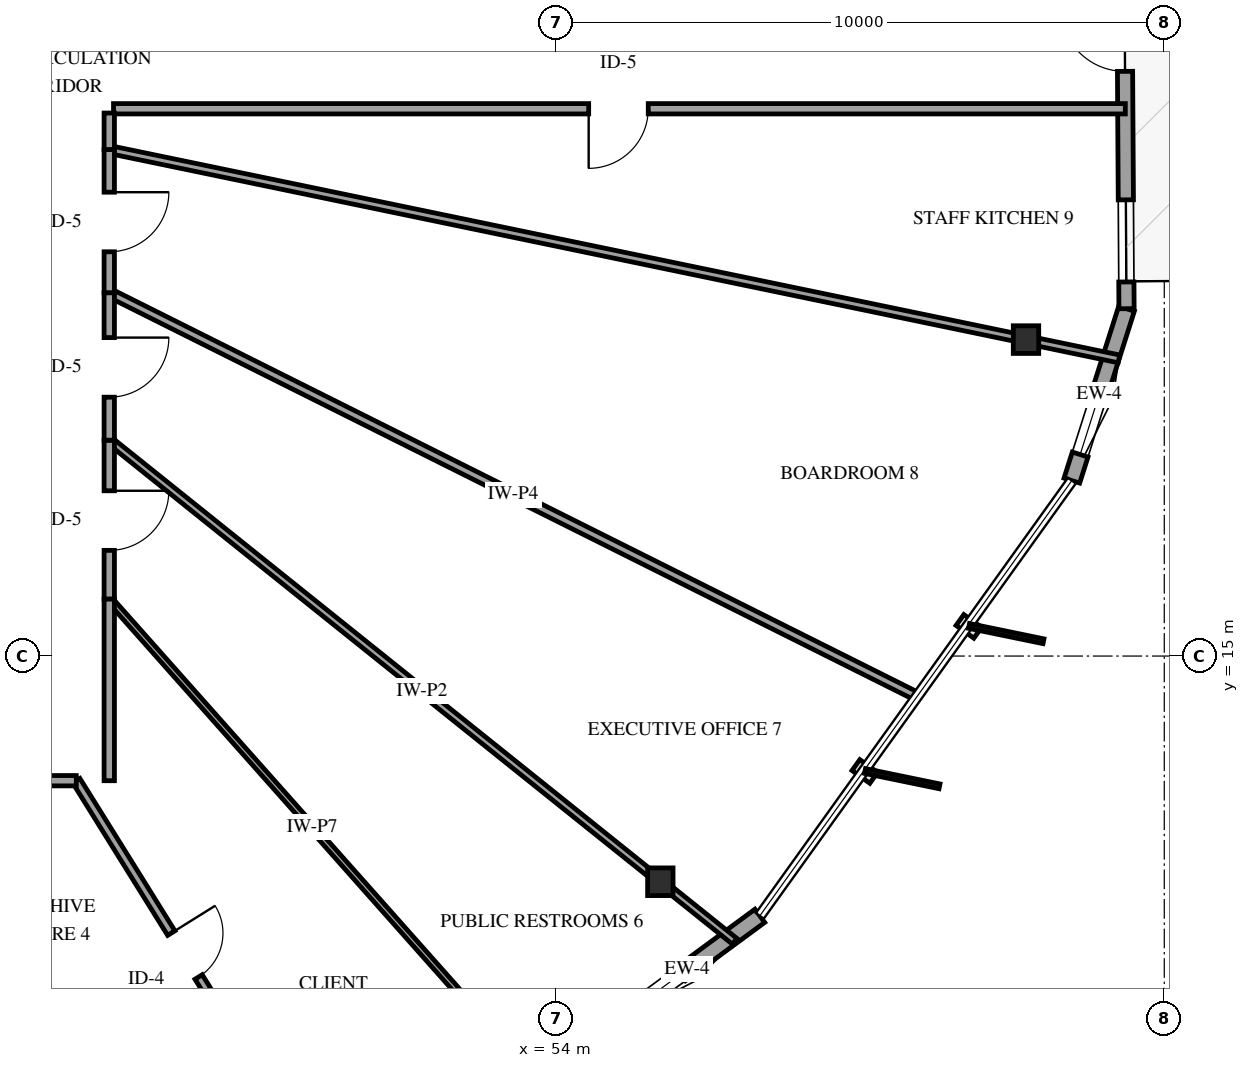
"""IFC4 building model, lengths in metres.
Left out: names, types, materials, properties, quantities, classifications, styles, units other than length and angle.
Written with IfcOpenShell. Run it as: python <this file> out.ifc"""

import sys

from ifc_helpers import new_model, si_unit, direction, frame, frame_2d, origin, origin_2d, place, context, subcontext, project, spatial, rectangle, i_section, extrude, element, fill, save


model = new_model("IFC4")
c1 = context("Model", 3, precision=1e-05, world=origin(), true_north=direction((0.0, 1.0)))
c2 = subcontext(c1, "Body", "Model", "MODEL_VIEW")
j1 = project(units=[si_unit("LENGTHUNIT", "METRE"), si_unit("PLANEANGLEUNIT", "RADIAN")], contexts=[c1])
p1 = place(None, origin())
s1 = spatial("IfcSite", under=j1, at=p1, CompositionType="ELEMENT")
p2 = place(p1, origin())
s2 = spatial("IfcBuilding", under=s1, at=p2, CompositionType="ELEMENT")
p3 = place(p2, frame((0.0, 0.0, 99.1)))
s3 = spatial("IfcBuildingStorey", under=s2, at=p3, CompositionType="ELEMENT", Elevation=99.1)
for number, where, z_axis, x_axis in (
    (1, (55.712, 11.289, 0.0), (0.0, 0.0, 1.0), (1.0, 0.0, 0.0)),
    (2, (61.726, 20.204, 0.0), (0.0, 0.0, 1.0), (1.0, 0.0, 0.0)),
):
    element("IfcColumn", number, at=place(p3, frame(where, z_axis=z_axis, x_axis=x_axis)), inside=s3, PredefinedType="COLUMN", context=c2, shape_type="SweptSolid", body=[
        extrude(i_section(OverallWidth=0.418, OverallDepth=0.455, WebThickness=0.042, FlangeThickness=0.068, FilletRadius=0.038, at=origin_2d()), origin(), (0.0, 0.0, 1.0), 3.9),
    ])
p4 = place(p3, frame((54.96, 8.969, 0.0), z_axis=(0.0, 0.0, 1.0), x_axis=(0.80529158798, 0.592878957569, 0.0)))
e3 = element("IfcWall", 3, at=p4, inside=s3, PredefinedType="SOLIDWALL", context=c2, shape_type="SweptSolid", body=[
    extrude(rectangle(XDim=2.967, YDim=0.27, at=frame_2d((1.483, 0.0))), origin(), (0.0, 0.0, 1.0), 2.979),
])
p5 = place(p4, frame((0.45, 0.0, 0.75)))
e4 = element("IfcOpeningElement", 4, at=p5, cuts=e3, PredefinedType="OPENING", context=c2, shape_type="SweptSolid", body=[
    extrude(rectangle(XDim=0.9, YDim=1.5, at=frame_2d((0.45, 0.75))), frame((0.0, 0.145, 0.0), z_axis=(0.0, -1.0, 0.0), x_axis=(1.0, 0.0, 0.0)), (0.0, 0.0, 1.0), 0.29),
])
p6 = place(p3, frame((62.48, 17.885, 0.0), z_axis=(0.0, 0.0, 1.0), x_axis=(0.303013428865, 0.952986286327, 0.0)))
e5 = element("IfcWall", 5, at=p6, inside=s3, PredefinedType="SOLIDWALL", context=c2, shape_type="SweptSolid", body=[
    extrude(rectangle(XDim=2.967, YDim=0.27, at=frame_2d((1.483, 0.0))), origin(), (0.0, 0.0, 1.0), 2.979),
])
p7 = place(p6, frame((0.45, 0.0, 0.75)))
e6 = element("IfcOpeningElement", 6, at=p7, cuts=e5, PredefinedType="OPENING", context=c2, shape_type="SweptSolid", body=[
    extrude(rectangle(XDim=0.9, YDim=1.5, at=frame_2d((0.45, 0.75))), frame((0.0, 0.145, 0.0), z_axis=(0.0, -1.0, 0.0), x_axis=(1.0, 0.0, 0.0)), (0.0, 0.0, 1.0), 0.29),
])
p8 = place(p3, frame((63.379, 20.712, 0.0), z_axis=(0.0, 0.0, 1.0), x_axis=(-0.006293019465, 0.999980198757, 0.0)))
e7 = element("IfcWall", 7, at=p8, inside=s3, PredefinedType="SOLIDWALL", context=c2, shape_type="SweptSolid", body=[
    extrude(rectangle(XDim=8.807, YDim=0.25, at=frame_2d((4.403, 0.0))), origin(), (0.0, 0.0, 1.0), 2.979),
])
p9 = place(p8, frame((3.903, 0.0, 0.0)))
e8 = element("IfcOpeningElement", 8, at=p9, cuts=e7, PredefinedType="OPENING", context=c2, shape_type="SweptSolid", body=[
    extrude(rectangle(XDim=1.05, YDim=2.15, at=frame_2d((0.525, 1.075))), frame((0.0, 0.135, 0.0), z_axis=(0.0, -1.0, 0.0), x_axis=(1.0, 0.0, 0.0)), (0.0, 0.0, 1.0), 0.27),
])
p10 = place(p8, frame((0.44, 0.0, 0.72)))
e9 = element("IfcOpeningElement", 9, at=p10, cuts=e7, PredefinedType="OPENING", context=c2, shape_type="SweptSolid", body=[
    extrude(rectangle(XDim=1.35, YDim=1.65, at=frame_2d((0.675, 0.825))), frame((0.0, 0.135, 0.0), z_axis=(0.0, -1.0, 0.0), x_axis=(1.0, 0.0, 0.0)), (0.0, 0.0, 1.0), 0.27),
])
p11 = place(p8, frame((5.593, 0.0, 0.72)))
e10 = element("IfcOpeningElement", 10, at=p11, cuts=e7, PredefinedType="OPENING", context=c2, shape_type="SweptSolid", body=[
    extrude(rectangle(XDim=1.35, YDim=1.65, at=frame_2d((0.675, 0.825))), frame((0.0, 0.135, 0.0), z_axis=(0.0, -1.0, 0.0), x_axis=(1.0, 0.0, 0.0)), (0.0, 0.0, 1.0), 0.27),
])
p12 = place(p3, frame((46.65, 23.33, 0.0), z_axis=(0.0, 0.0, 1.0), x_axis=(0.979169010493, -0.203046913027, 0.0)))
e11 = element("IfcWall", 11, at=p12, inside=s3, PredefinedType="PARTITIONING", context=c2, shape_type="SweptSolid", body=[
    extrude(rectangle(XDim=16.957, YDim=0.13, at=frame_2d((8.479, 0.0))), origin(), (0.0, 0.0, 1.0), 2.895),
])
p13 = place(p3, frame((63.359, 24.0, 0.0), z_axis=(0.0, 0.0, 1.0), x_axis=(-1.0, 0.0, 0.0)))
e12 = element("IfcWall", 12, at=p13, inside=s3, PredefinedType="PARTITIONING", context=c2, shape_type="SweptSolid", body=[
    extrude(rectangle(XDim=16.639, YDim=0.17, at=frame_2d((8.319, 0.0))), origin(), (0.0, 0.0, 1.0), 3.6),
])
p14 = place(p13, frame((7.845, 0.0, 0.0)))
e13 = element("IfcOpeningElement", 13, at=p14, cuts=e12, PredefinedType="OPENING", context=c2, shape_type="SweptSolid", body=[
    extrude(rectangle(XDim=0.98, YDim=2.15, at=frame_2d((0.49, 1.075))), frame((0.0, 0.095, 0.0), z_axis=(0.0, -1.0, 0.0), x_axis=(1.0, 0.0, 0.0)), (0.0, 0.0, 1.0), 0.19),
])
p15 = place(p3, frame((46.65, 20.975, 0.0), z_axis=(0.0, 0.0, 1.0), x_axis=(0.894492933533, -0.447082086266, 0.0)))
e14 = element("IfcWall", 14, at=p15, inside=s3, PredefinedType="PARTITIONING", context=c2, shape_type="SweptSolid", body=[
    extrude(rectangle(XDim=14.852, YDim=0.14, at=frame_2d((7.426, 0.0))), origin(), (0.0, 0.0, 1.0), 3.6),
])
p16 = place(p3, frame((46.65, 18.55, 0.0), z_axis=(0.0, 0.0, 1.0), x_axis=(0.780393276033, -0.625289000961, 0.0)))
e15 = element("IfcWall", 15, at=p16, inside=s3, PredefinedType="PARTITIONING", context=c2, shape_type="SweptSolid", body=[
    extrude(rectangle(XDim=13.179, YDim=0.12, at=frame_2d((6.59, 0.0))), origin(), (0.0, 0.0, 1.0), 2.978),
])
p17 = place(p3, frame((46.65, 15.936, 0.0), z_axis=(0.0, 0.0, 1.0), x_axis=(0.664172243605, -0.7475795816, 0.0)))
e16 = element("IfcWall", 16, at=p17, inside=s3, PredefinedType="PARTITIONING", context=c2, shape_type="SweptSolid", body=[
    extrude(rectangle(XDim=10.046, YDim=0.1, at=frame_2d((5.023, 0.0))), origin(), (0.0, 0.0, 1.0), 2.978),
])
p18 = place(p3, frame((43.455, 12.95, 0.0), z_axis=(0.0, 0.0, 1.0), x_axis=(0.373850874789, -0.927488826574, 0.0)))
e17 = element("IfcWall", 17, at=p18, inside=s3, PredefinedType="PARTITIONING", context=c2, shape_type="SweptSolid", body=[
    extrude(rectangle(XDim=7.353, YDim=0.12, at=frame_2d((3.677, 0.0))), origin(), (0.0, 0.0, 1.0), 2.895),
])
p19 = place(p3, frame((46.108, 12.95, 0.0), z_axis=(0.0, 0.0, 1.0), x_axis=(0.528926462894, -0.848667659835, 0.0)))
e18 = element("IfcWall", 18, at=p19, inside=s3, PredefinedType="PARTITIONING", context=c2, shape_type="SweptSolid", body=[
    extrude(rectangle(XDim=6.755, YDim=0.14, at=frame_2d((3.377, 0.0))), origin(), (0.0, 0.0, 1.0), 3.6),
])
p20 = place(p19, frame((2.953, 0.0, 0.0)))
e19 = element("IfcOpeningElement", 19, at=p20, cuts=e18, PredefinedType="OPENING", context=c2, shape_type="SweptSolid", body=[
    extrude(rectangle(XDim=0.85, YDim=2.1, at=frame_2d((0.425, 1.05))), frame((0.0, 0.08, 0.0), z_axis=(0.0, -1.0, 0.0), x_axis=(1.0, 0.0, 0.0)), (0.0, 0.0, 1.0), 0.16),
])
p21 = place(p3, frame((46.108, 12.95, 0.0), z_axis=(0.0, 0.0, 1.0), x_axis=(-1.0, 0.0, 0.0)))
e20 = element("IfcWall", 20, at=p21, inside=s3, PredefinedType="PARTITIONING", context=c2, shape_type="SweptSolid", body=[
    extrude(rectangle(XDim=2.653, YDim=0.17, at=frame_2d((1.326, 0.0))), origin(), (0.0, 0.0, 1.0), 3.6),
])
p22 = place(p21, frame((0.851, 0.0, 0.0)))
e21 = element("IfcOpeningElement", 21, at=p22, cuts=e20, PredefinedType="OPENING", context=c2, shape_type="SweptSolid", body=[
    extrude(rectangle(XDim=0.98, YDim=2.15, at=frame_2d((0.49, 1.075))), frame((0.0, 0.095, 0.0), z_axis=(0.0, -1.0, 0.0), x_axis=(1.0, 0.0, 0.0)), (0.0, 0.0, 1.0), 0.19),
])
p23 = place(p3, frame((46.65, 18.55, 0.0), z_axis=(0.0, 0.0, 1.0), x_axis=(0.0, -1.0, 0.0)))
e22 = element("IfcWall", 22, at=p23, inside=s3, PredefinedType="PARTITIONING", context=c2, shape_type="SweptSolid", body=[
    extrude(rectangle(XDim=2.614, YDim=0.17, at=frame_2d((1.307, 0.0))), origin(), (0.0, 0.0, 1.0), 3.6),
])
p24 = place(p23, frame((0.832, 0.0, 0.0)))
e23 = element("IfcOpeningElement", 23, at=p24, cuts=e22, PredefinedType="OPENING", context=c2, shape_type="SweptSolid", body=[
    extrude(rectangle(XDim=0.98, YDim=2.15, at=frame_2d((0.49, 1.075))), frame((0.0, 0.095, 0.0), z_axis=(0.0, -1.0, 0.0), x_axis=(1.0, 0.0, 0.0)), (0.0, 0.0, 1.0), 0.19),
])
p25 = place(p3, frame((46.65, 20.975, 0.0), z_axis=(0.0, 0.0, 1.0), x_axis=(0.0, -1.0, 0.0)))
e24 = element("IfcWall", 24, at=p25, inside=s3, PredefinedType="PARTITIONING", context=c2, shape_type="SweptSolid", body=[
    extrude(rectangle(XDim=2.425, YDim=0.17, at=frame_2d((1.212, 0.0))), origin(), (0.0, 0.0, 1.0), 3.6),
])
p26 = place(p25, frame((0.738, 0.0, 0.0)))
e25 = element("IfcOpeningElement", 25, at=p26, cuts=e24, PredefinedType="OPENING", context=c2, shape_type="SweptSolid", body=[
    extrude(rectangle(XDim=0.98, YDim=2.15, at=frame_2d((0.49, 1.075))), frame((0.0, 0.095, 0.0), z_axis=(0.0, -1.0, 0.0), x_axis=(1.0, 0.0, 0.0)), (0.0, 0.0, 1.0), 0.19),
])
p27 = place(p3, frame((46.65, 23.33, 0.0), z_axis=(0.0, 0.0, 1.0), x_axis=(0.0, -1.0, 0.0)))
e26 = element("IfcWall", 26, at=p27, inside=s3, PredefinedType="PARTITIONING", context=c2, shape_type="SweptSolid", body=[
    extrude(rectangle(XDim=2.355, YDim=0.17, at=frame_2d((1.177, 0.0))), origin(), (0.0, 0.0, 1.0), 3.6),
])
p28 = place(p27, frame((0.702, 0.0, 0.0)))
e27 = element("IfcOpeningElement", 27, at=p28, cuts=e26, PredefinedType="OPENING", context=c2, shape_type="SweptSolid", body=[
    extrude(rectangle(XDim=0.98, YDim=2.15, at=frame_2d((0.49, 1.075))), frame((0.0, 0.095, 0.0), z_axis=(0.0, -1.0, 0.0), x_axis=(1.0, 0.0, 0.0)), (0.0, 0.0, 1.0), 0.19),
])
p29 = place(p3, frame((46.65, 23.93, 0.0), z_axis=(0.0, 0.0, 1.0), x_axis=(0.0, -1.0, 0.0)))
e28 = element("IfcWall", 28, at=p29, inside=s3, PredefinedType="PARTITIONING", context=c2, shape_type="SweptSolid", body=[
    extrude(rectangle(XDim=0.6, YDim=0.17, at=frame_2d((0.3, 0.0))), origin(), (0.0, 0.0, 1.0), 3.6),
])
p30 = place(p3, frame((46.65, 15.936, 0.0), z_axis=(0.0, 0.0, 1.0), x_axis=(0.0, -1.0, 0.0)))
e29 = element("IfcWall", 29, at=p30, inside=s3, PredefinedType="PARTITIONING", context=c2, shape_type="SweptSolid", body=[
    extrude(rectangle(XDim=2.986, YDim=0.17, at=frame_2d((1.493, 0.0))), origin(), (0.0, 0.0, 1.0), 3.6),
])
p31 = place(p5, origin())
e30 = element("IfcWindow", 30, at=p31, inside=s3, PartitioningType="SINGLE_PANEL", PredefinedType="WINDOW", context=c2, shape_type="SweptSolid", body=[
    extrude(rectangle(XDim=0.9, YDim=1.5, at=frame_2d((0.45, 0.75))), frame((0.0, 0.03, 0.0), z_axis=(0.0, -1.0, 0.0), x_axis=(1.0, 0.0, 0.0)), (0.0, 0.0, 1.0), 0.06),
])
fill(e4, e30)
p32 = place(p7, origin())
e31 = element("IfcWindow", 31, at=p32, inside=s3, PartitioningType="SINGLE_PANEL", PredefinedType="WINDOW", context=c2, shape_type="SweptSolid", body=[
    extrude(rectangle(XDim=0.9, YDim=1.5, at=frame_2d((0.45, 0.75))), frame((0.0, 0.03, 0.0), z_axis=(0.0, -1.0, 0.0), x_axis=(1.0, 0.0, 0.0)), (0.0, 0.0, 1.0), 0.06),
])
fill(e6, e31)
p33 = place(p9, origin())
e32 = element("IfcDoor", 32, at=p33, inside=s3, OperationType="SINGLE_SWING_RIGHT", PredefinedType="DOOR", context=c2, shape_type="SweptSolid", body=[
    extrude(rectangle(XDim=1.05, YDim=2.15, at=frame_2d((0.525, 1.075))), frame((0.0, 0.025, 0.0), z_axis=(0.0, -1.0, 0.0), x_axis=(1.0, 0.0, 0.0)), (0.0, 0.0, 1.0), 0.05),
])
fill(e8, e32)
p34 = place(p10, origin())
e33 = element("IfcWindow", 33, at=p34, inside=s3, PartitioningType="SINGLE_PANEL", PredefinedType="WINDOW", context=c2, shape_type="SweptSolid", body=[
    extrude(rectangle(XDim=1.35, YDim=1.65, at=frame_2d((0.675, 0.825))), frame((0.0, 0.03, 0.0), z_axis=(0.0, -1.0, 0.0), x_axis=(1.0, 0.0, 0.0)), (0.0, 0.0, 1.0), 0.06),
])
fill(e9, e33)
p35 = place(p14, origin())
e34 = element("IfcDoor", 34, at=p35, inside=s3, OperationType="SINGLE_SWING_RIGHT", PredefinedType="DOOR", context=c2, shape_type="SweptSolid", body=[
    extrude(rectangle(XDim=0.98, YDim=2.15, at=frame_2d((0.49, 1.075))), frame((0.0, 0.025, 0.0), z_axis=(0.0, -1.0, 0.0), x_axis=(1.0, 0.0, 0.0)), (0.0, 0.0, 1.0), 0.05),
])
fill(e13, e34)
p36 = place(p20, origin())
e35 = element("IfcDoor", 35, at=p36, inside=s3, OperationType="SINGLE_SWING_LEFT", PredefinedType="DOOR", context=c2, shape_type="SweptSolid", body=[
    extrude(rectangle(XDim=0.85, YDim=2.1, at=frame_2d((0.425, 1.05))), frame((0.0, 0.025, 0.0), z_axis=(0.0, -1.0, 0.0), x_axis=(1.0, 0.0, 0.0)), (0.0, 0.0, 1.0), 0.05),
])
fill(e19, e35)
p37 = place(p24, origin())
e36 = element("IfcDoor", 36, at=p37, inside=s3, OperationType="SINGLE_SWING_LEFT", PredefinedType="DOOR", context=c2, shape_type="SweptSolid", body=[
    extrude(rectangle(XDim=0.98, YDim=2.15, at=frame_2d((0.49, 1.075))), frame((0.0, 0.025, 0.0), z_axis=(0.0, -1.0, 0.0), x_axis=(1.0, 0.0, 0.0)), (0.0, 0.0, 1.0), 0.05),
])
fill(e23, e36)
p38 = place(p26, origin())
e37 = element("IfcDoor", 37, at=p38, inside=s3, OperationType="SINGLE_SWING_LEFT", PredefinedType="DOOR", context=c2, shape_type="SweptSolid", body=[
    extrude(rectangle(XDim=0.98, YDim=2.15, at=frame_2d((0.49, 1.075))), frame((0.0, 0.025, 0.0), z_axis=(0.0, -1.0, 0.0), x_axis=(1.0, 0.0, 0.0)), (0.0, 0.0, 1.0), 0.05),
])
fill(e25, e37)
p39 = place(p28, origin())
e38 = element("IfcDoor", 38, at=p39, inside=s3, OperationType="SINGLE_SWING_LEFT", PredefinedType="DOOR", context=c2, shape_type="SweptSolid", body=[
    extrude(rectangle(XDim=0.98, YDim=2.15, at=frame_2d((0.49, 1.075))), frame((0.0, 0.025, 0.0), z_axis=(0.0, -1.0, 0.0), x_axis=(1.0, 0.0, 0.0)), (0.0, 0.0, 1.0), 0.05),
])
fill(e27, e38)
save(model, sys.argv[1])
